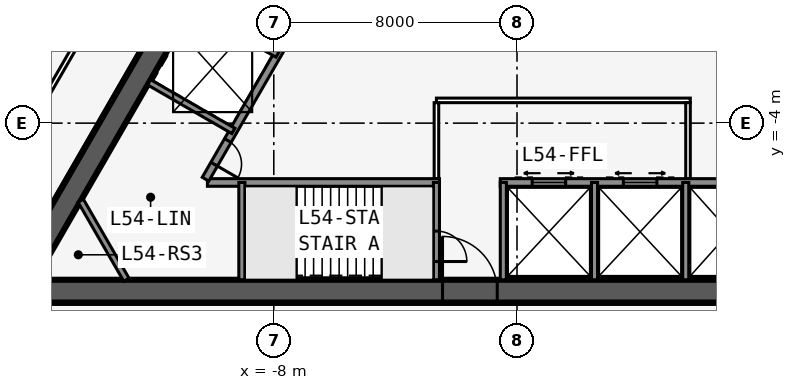
"""IFC4 building model, lengths in metres.
Left out: names, types, materials, properties, quantities, classifications, styles, units other than length and angle.
Written with IfcOpenShell. Run it as: python <this file> out.ifc"""

import sys

from ifc_helpers import new_model, si_unit, direction, frame, frame_2d, origin, place, context, subcontext, project, spatial, rectangle, extrude, element, fill, save


model = new_model("IFC4")
c1 = context("Model", 3, precision=1e-05, world=origin(), true_north=direction((0.0, 1.0)))
c2 = subcontext(c1, "Body", "Model", "MODEL_VIEW")
j1 = project(units=[si_unit("LENGTHUNIT", "METRE"), si_unit("PLANEANGLEUNIT", "RADIAN")], contexts=[c1])
p1 = place(None, origin())
s1 = spatial("IfcSite", under=j1, at=p1, CompositionType="ELEMENT")
p2 = place(p1, origin())
s2 = spatial("IfcBuilding", under=s1, at=p2, CompositionType="ELEMENT")
p3 = place(p2, frame((0.0, 0.0, 204.5)))
s3 = spatial("IfcBuildingStorey", under=s2, at=p3, CompositionType="ELEMENT", Elevation=204.5)
p4 = place(p3, frame((-16.5, -9.526, 0.0), z_axis=(0.0, 0.0, 1.0), x_axis=(1.0, 0.0, 0.0)))
e1 = element("IfcWall", 1, at=p4, inside=s3, PredefinedType="SHEAR", context=c2, shape_type="SweptSolid", body=[
    extrude(rectangle(XDim=33.0, YDim=0.75, at=frame_2d((16.5, 0.0))), origin(), (0.0, 0.0, 1.0), 3.6),
])
p5 = place(p4, frame((14.05, 0.0, 0.0)))
e2 = element("IfcOpeningElement", 2, at=p5, cuts=e1, PredefinedType="OPENING", context=c2, shape_type="SweptSolid", body=[
    extrude(rectangle(XDim=1.8, YDim=2.13, at=frame_2d((0.9, 1.065))), frame((0.0, 0.385, 0.0), z_axis=(0.0, -1.0, 0.0), x_axis=(1.0, 0.0, 0.0)), (0.0, 0.0, 1.0), 0.77),
])
p6 = place(p3, frame((-10.183, -5.951, 0.0), z_axis=(0.0, 0.0, 1.0), x_axis=(1.0, 0.0, 0.0)))
e3 = element("IfcWall", 3, at=p6, inside=s3, PredefinedType="SOLIDWALL", context=c2, shape_type="SweptSolid", body=[
    extrude(rectangle(XDim=7.633, YDim=0.25, at=frame_2d((3.816, 0.0))), origin(), (0.0, 0.0, 1.0), 3.435),
])
p7 = place(p3, frame((-0.55, -5.951, 0.0), z_axis=(0.0, 0.0, 1.0), x_axis=(1.0, 0.0, 0.0)))
e4 = element("IfcWall", 4, at=p7, inside=s3, PredefinedType="SOLIDWALL", context=c2, shape_type="SweptSolid", body=[
    extrude(rectangle(XDim=10.733, YDim=0.25, at=frame_2d((5.366, 0.0))), origin(), (0.0, 0.0, 1.0), 3.435),
])
p8 = place(p7, frame((9.314, 0.0, 0.0)))
e5 = element("IfcOpeningElement", 5, at=p8, cuts=e4, PredefinedType="OPENING", context=c2, shape_type="SweptSolid", body=[
    extrude(rectangle(XDim=0.9, YDim=2.13, at=frame_2d((0.45, 1.065))), frame((0.0, 0.135, 0.0), z_axis=(0.0, -1.0, 0.0), x_axis=(1.0, 0.0, 0.0)), (0.0, 0.0, 1.0), 0.27),
])
p9 = place(p7, frame((1.05, 0.0, 0.0)))
e6 = element("IfcOpeningElement", 6, at=p9, cuts=e4, PredefinedType="OPENING", context=c2, shape_type="SweptSolid", body=[
    extrude(rectangle(XDim=1.1, YDim=2.13, at=frame_2d((0.55, 1.065))), frame((0.0, 0.135, 0.0), z_axis=(0.0, -1.0, 0.0), x_axis=(1.0, 0.0, 0.0)), (0.0, 0.0, 1.0), 0.27),
])
p10 = place(p7, frame((4.05, 0.0, 0.0)))
e7 = element("IfcOpeningElement", 7, at=p10, cuts=e4, PredefinedType="OPENING", context=c2, shape_type="SweptSolid", body=[
    extrude(rectangle(XDim=1.1, YDim=2.13, at=frame_2d((0.55, 1.065))), frame((0.0, 0.135, 0.0), z_axis=(0.0, -1.0, 0.0), x_axis=(1.0, 0.0, 0.0)), (0.0, 0.0, 1.0), 0.27),
])
p11 = place(p3, frame((-9.05, -5.951, 0.0), z_axis=(0.0, 0.0, 1.0), x_axis=(0.0, -1.0, 0.0)))
e8 = element("IfcWall", 8, at=p11, inside=s3, PredefinedType="SOLIDWALL", context=c2, shape_type="SweptSolid", body=[
    extrude(rectangle(XDim=3.2, YDim=0.2, at=frame_2d((1.6, 0.0))), origin(), (0.0, 0.0, 1.0), 3.435),
])
p12 = place(p3, frame((-2.65, -5.951, 0.0), z_axis=(0.0, 0.0, 1.0), x_axis=(0.0, -1.0, 0.0)))
e9 = element("IfcWall", 9, at=p12, inside=s3, PredefinedType="SOLIDWALL", context=c2, shape_type="SweptSolid", body=[
    extrude(rectangle(XDim=3.2, YDim=0.2, at=frame_2d((1.6, 0.0))), origin(), (0.0, 0.0, 1.0), 3.435),
])
p13 = place(p12, frame((1.6, 0.0, 0.0)))
e10 = element("IfcOpeningElement", 10, at=p13, cuts=e9, PredefinedType="OPENING", context=c2, shape_type="SweptSolid", body=[
    extrude(rectangle(XDim=1.0, YDim=2.13, at=frame_2d((0.5, 1.065))), frame((0.0, 0.11, 0.0), z_axis=(0.0, -1.0, 0.0), x_axis=(1.0, 0.0, 0.0)), (0.0, 0.0, 1.0), 0.22),
])
for number, where, z_axis, x_axis in (
    (11, (-0.45, -5.951, 0.0), (0.0, 0.0, 1.0), (0.0, -1.0, 0.0)),
    (12, (2.55, -5.951, 0.0), (0.0, 0.0, 1.0), (0.0, -1.0, 0.0)),
    (13, (5.55, -5.951, 0.0), (0.0, 0.0, 1.0), (0.0, -1.0, 0.0)),
):
    element("IfcWall", number, at=place(p3, frame(where, z_axis=z_axis, x_axis=x_axis)), inside=s3, PredefinedType="SOLIDWALL", context=c2, shape_type="SweptSolid", body=[
        extrude(rectangle(XDim=3.2, YDim=0.2, at=frame_2d((1.6, 0.0))), origin(), (0.0, 0.0, 1.0), 3.435),
    ])
p14 = place(p3, frame((16.5, -9.526, 0.0), z_axis=(0.0, 0.0, 1.0), x_axis=(-0.499999749417, 0.866025548458, 0.0)))
e14 = element("IfcWall", 14, at=p14, inside=s3, PredefinedType="SHEAR", context=c2, shape_type="SweptSolid", body=[
    extrude(rectangle(XDim=33.0, YDim=0.75, at=frame_2d((16.5, 0.0))), origin(), (0.0, 0.0, 1.0), 3.6),
])
p15 = place(p14, frame((14.15, 0.0, 0.0)))
e15 = element("IfcOpeningElement", 15, at=p15, cuts=e14, PredefinedType="OPENING", context=c2, shape_type="SweptSolid", body=[
    extrude(rectangle(XDim=1.8, YDim=2.13, at=frame_2d((0.9, 1.065))), frame((0.0, 0.385, 0.0), z_axis=(0.0, -1.0, 0.0), x_axis=(1.0, 0.0, 0.0)), (0.0, 0.0, 1.0), 0.77),
])
p16 = place(p14, frame((12.6, 0.0, 0.0)))
e16 = element("IfcOpeningElement", 16, at=p16, cuts=e14, PredefinedType="OPENING", context=c2, shape_type="SweptSolid", body=[
    extrude(rectangle(XDim=1.0, YDim=2.13, at=frame_2d((0.5, 1.065))), frame((0.0, 0.385, 0.0), z_axis=(0.0, -1.0, 0.0), x_axis=(1.0, 0.0, 0.0)), (0.0, 0.0, 1.0), 0.77),
])
p17 = place(p3, frame((10.245, -5.843, 0.0), z_axis=(0.0, 0.0, 1.0), x_axis=(-0.499993009313, 0.866029439822, 0.0)))
e17 = element("IfcWall", 17, at=p17, inside=s3, PredefinedType="SOLIDWALL", context=c2, shape_type="SweptSolid", body=[
    extrude(rectangle(XDim=7.733, YDim=0.25, at=frame_2d((3.866, 0.0))), origin(), (0.0, 0.0, 1.0), 3.435),
])
p18 = place(p3, frame((0.0, 19.052, 0.0), z_axis=(0.0, 0.0, 1.0), x_axis=(-0.499999749417, -0.866025548458, 0.0)))
e18 = element("IfcWall", 18, at=p18, inside=s3, PredefinedType="SHEAR", context=c2, shape_type="SweptSolid", body=[
    extrude(rectangle(XDim=33.0, YDim=0.75, at=frame_2d((16.5, 0.0))), origin(), (0.0, 0.0, 1.0), 3.6),
])
p19 = place(p18, frame((14.15, 0.0, 0.0)))
e19 = element("IfcOpeningElement", 19, at=p19, cuts=e18, PredefinedType="OPENING", context=c2, shape_type="SweptSolid", body=[
    extrude(rectangle(XDim=1.8, YDim=2.13, at=frame_2d((0.9, 1.065))), frame((0.0, 0.385, 0.0), z_axis=(0.0, -1.0, 0.0), x_axis=(1.0, 0.0, 0.0)), (0.0, 0.0, 1.0), 0.77),
])
p20 = place(p18, frame((12.6, 0.0, 0.0)))
e20 = element("IfcOpeningElement", 20, at=p20, cuts=e18, PredefinedType="OPENING", context=c2, shape_type="SweptSolid", body=[
    extrude(rectangle(XDim=1.0, YDim=2.13, at=frame_2d((0.5, 1.065))), frame((0.0, 0.385, 0.0), z_axis=(0.0, -1.0, 0.0), x_axis=(1.0, 0.0, 0.0)), (0.0, 0.0, 1.0), 0.77),
])
p21 = place(p3, frame((-4.929, 3.365, 0.0), z_axis=(0.0, 0.0, 1.0), x_axis=(-0.499991433582, -0.866030349552, 0.0)))
e21 = element("IfcWall", 21, at=p21, inside=s3, PredefinedType="SOLIDWALL", context=c2, shape_type="SweptSolid", body=[
    extrude(rectangle(XDim=10.633, YDim=0.25, at=frame_2d((5.316, 0.0))), origin(), (0.0, 0.0, 1.0), 3.435),
])
p22 = place(p21, frame((9.164, 0.0, 0.0)))
e22 = element("IfcOpeningElement", 22, at=p22, cuts=e21, PredefinedType="OPENING", context=c2, shape_type="SweptSolid", body=[
    extrude(rectangle(XDim=0.9, YDim=2.13, at=frame_2d((0.45, 1.065))), frame((0.0, 0.135, 0.0), z_axis=(0.0, -1.0, 0.0), x_axis=(1.0, 0.0, 0.0)), (0.0, 0.0, 1.0), 0.27),
])
p23 = place(p21, frame((1.1, 0.0, 0.0)))
e23 = element("IfcOpeningElement", 23, at=p23, cuts=e21, PredefinedType="OPENING", context=c2, shape_type="SweptSolid", body=[
    extrude(rectangle(XDim=0.9, YDim=2.13, at=frame_2d((0.45, 1.065))), frame((0.0, 0.135, 0.0), z_axis=(0.0, -1.0, 0.0), x_axis=(1.0, 0.0, 0.0)), (0.0, 0.0, 1.0), 0.27),
])
p24 = place(p21, frame((4.0, 0.0, 0.0)))
e24 = element("IfcOpeningElement", 24, at=p24, cuts=e21, PredefinedType="OPENING", context=c2, shape_type="SweptSolid", body=[
    extrude(rectangle(XDim=0.9, YDim=2.13, at=frame_2d((0.45, 1.065))), frame((0.0, 0.135, 0.0), z_axis=(0.0, -1.0, 0.0), x_axis=(1.0, 0.0, 0.0)), (0.0, 0.0, 1.0), 0.27),
])
p25 = place(p3, frame((-7.879, -1.744, 0.0), z_axis=(0.0, 0.0, 1.0), x_axis=(-0.866042017984, 0.499971222258, 0.0)))
e25 = element("IfcWall", 25, at=p25, inside=s3, PredefinedType="SOLIDWALL", context=c2, shape_type="SweptSolid", body=[
    extrude(rectangle(XDim=3.2, YDim=0.2, at=frame_2d((1.6, 0.0))), origin(), (0.0, 0.0, 1.0), 3.435),
])
p26 = place(p3, frame((-9.329, -4.256, 0.0), z_axis=(0.0, 0.0, 1.0), x_axis=(-0.866022944154, 0.50000426018, 0.0)))
e26 = element("IfcWall", 26, at=p26, inside=s3, PredefinedType="SOLIDWALL", context=c2, shape_type="SweptSolid", body=[
    extrude(rectangle(XDim=3.2, YDim=0.2, at=frame_2d((1.6, 0.0))), origin(), (0.0, 0.0, 1.0), 3.435),
])
p27 = place(p3, frame((20.102, -11.115, 0.0), z_axis=(0.0, 0.0, 1.0), x_axis=(-0.500000265775, 0.866025250339, 0.0)))
e27 = element("IfcWall", 27, at=p27, inside=s3, PredefinedType="PARTITIONING", context=c2, shape_type="SweptSolid", body=[
    extrude(rectangle(XDim=39.354, YDim=0.15, at=frame_2d((19.677, 0.0))), origin(), (0.0, 0.0, 1.0), 3.435),
])
p28 = place(p27, frame((1.665, 0.0, 0.0)))
e28 = element("IfcOpeningElement", 28, at=p28, cuts=e27, PredefinedType="OPENING", context=c2, shape_type="SweptSolid", body=[
    extrude(rectangle(XDim=0.95, YDim=2.13, at=frame_2d((0.475, 1.065))), frame((0.0, 0.085, 0.0), z_axis=(0.0, -1.0, 0.0), x_axis=(1.0, 0.0, 0.0)), (0.0, 0.0, 1.0), 0.17),
])
p29 = place(p27, frame((12.902, 0.0, 0.0)))
e29 = element("IfcOpeningElement", 29, at=p29, cuts=e27, PredefinedType="OPENING", context=c2, shape_type="SweptSolid", body=[
    extrude(rectangle(XDim=0.95, YDim=2.13, at=frame_2d((0.475, 1.065))), frame((0.0, 0.085, 0.0), z_axis=(0.0, -1.0, 0.0), x_axis=(1.0, 0.0, 0.0)), (0.0, 0.0, 1.0), 0.17),
])
p30 = place(p27, frame((17.302, 0.0, 0.0)))
e30 = element("IfcOpeningElement", 30, at=p30, cuts=e27, PredefinedType="OPENING", context=c2, shape_type="SweptSolid", body=[
    extrude(rectangle(XDim=0.95, YDim=2.13, at=frame_2d((0.475, 1.065))), frame((0.0, 0.085, 0.0), z_axis=(0.0, -1.0, 0.0), x_axis=(1.0, 0.0, 0.0)), (0.0, 0.0, 1.0), 0.17),
])
p31 = place(p27, frame((22.902, 0.0, 0.0)))
e31 = element("IfcOpeningElement", 31, at=p31, cuts=e27, PredefinedType="OPENING", context=c2, shape_type="SweptSolid", body=[
    extrude(rectangle(XDim=0.95, YDim=2.13, at=frame_2d((0.475, 1.065))), frame((0.0, 0.085, 0.0), z_axis=(0.0, -1.0, 0.0), x_axis=(1.0, 0.0, 0.0)), (0.0, 0.0, 1.0), 0.17),
])
p32 = place(p27, frame((32.302, 0.0, 0.0)))
e32 = element("IfcOpeningElement", 32, at=p32, cuts=e27, PredefinedType="OPENING", context=c2, shape_type="SweptSolid", body=[
    extrude(rectangle(XDim=0.95, YDim=2.13, at=frame_2d((0.475, 1.065))), frame((0.0, 0.085, 0.0), z_axis=(0.0, -1.0, 0.0), x_axis=(1.0, 0.0, 0.0)), (0.0, 0.0, 1.0), 0.17),
])
p33 = place(p27, frame((37.302, 0.0, 0.0)))
e33 = element("IfcOpeningElement", 33, at=p33, cuts=e27, PredefinedType="OPENING", context=c2, shape_type="SweptSolid", body=[
    extrude(rectangle(XDim=0.95, YDim=2.13, at=frame_2d((0.475, 1.065))), frame((0.0, 0.085, 0.0), z_axis=(0.0, -1.0, 0.0), x_axis=(1.0, 0.0, 0.0)), (0.0, 0.0, 1.0), 0.17),
])
p34 = place(p3, frame((-0.425, 22.966, 0.0), z_axis=(0.0, 0.0, 1.0), x_axis=(-0.500000265775, -0.866025250339, 0.0)))
e34 = element("IfcWall", 34, at=p34, inside=s3, PredefinedType="PARTITIONING", context=c2, shape_type="SweptSolid", body=[
    extrude(rectangle(XDim=39.354, YDim=0.15, at=frame_2d((19.677, 0.0))), origin(), (0.0, 0.0, 1.0), 3.435),
])
p35 = place(p34, frame((1.102, 0.0, 0.0)))
e35 = element("IfcOpeningElement", 35, at=p35, cuts=e34, PredefinedType="OPENING", context=c2, shape_type="SweptSolid", body=[
    extrude(rectangle(XDim=0.95, YDim=2.13, at=frame_2d((0.475, 1.065))), frame((0.0, 0.085, 0.0), z_axis=(0.0, -1.0, 0.0), x_axis=(1.0, 0.0, 0.0)), (0.0, 0.0, 1.0), 0.17),
])
p36 = place(p34, frame((7.902, 0.0, 0.0)))
e36 = element("IfcOpeningElement", 36, at=p36, cuts=e34, PredefinedType="OPENING", context=c2, shape_type="SweptSolid", body=[
    extrude(rectangle(XDim=0.95, YDim=2.13, at=frame_2d((0.475, 1.065))), frame((0.0, 0.085, 0.0), z_axis=(0.0, -1.0, 0.0), x_axis=(1.0, 0.0, 0.0)), (0.0, 0.0, 1.0), 0.17),
])
p37 = place(p34, frame((17.302, 0.0, 0.0)))
e37 = element("IfcOpeningElement", 37, at=p37, cuts=e34, PredefinedType="OPENING", context=c2, shape_type="SweptSolid", body=[
    extrude(rectangle(XDim=0.95, YDim=2.13, at=frame_2d((0.475, 1.065))), frame((0.0, 0.085, 0.0), z_axis=(0.0, -1.0, 0.0), x_axis=(1.0, 0.0, 0.0)), (0.0, 0.0, 1.0), 0.17),
])
p38 = place(p34, frame((26.702, 0.0, 0.0)))
e38 = element("IfcOpeningElement", 38, at=p38, cuts=e34, PredefinedType="OPENING", context=c2, shape_type="SweptSolid", body=[
    extrude(rectangle(XDim=0.95, YDim=2.13, at=frame_2d((0.475, 1.065))), frame((0.0, 0.085, 0.0), z_axis=(0.0, -1.0, 0.0), x_axis=(1.0, 0.0, 0.0)), (0.0, 0.0, 1.0), 0.17),
])
p39 = place(p34, frame((37.302, 0.0, 0.0)))
e39 = element("IfcOpeningElement", 39, at=p39, cuts=e34, PredefinedType="OPENING", context=c2, shape_type="SweptSolid", body=[
    extrude(rectangle(XDim=0.95, YDim=2.13, at=frame_2d((0.475, 1.065))), frame((0.0, 0.085, 0.0), z_axis=(0.0, -1.0, 0.0), x_axis=(1.0, 0.0, 0.0)), (0.0, 0.0, 1.0), 0.17),
])
p40 = place(p3, frame((-2.65, -3.251, 0.0), z_axis=(0.0, 0.0, 1.0), x_axis=(1.0, 0.0, 0.0)))
e40 = element("IfcWall", 40, at=p40, inside=s3, PredefinedType="PARTITIONING", context=c2, shape_type="SweptSolid", body=[
    extrude(rectangle(XDim=8.35, YDim=0.15, at=frame_2d((4.175, 0.0))), origin(), (0.0, 0.0, 1.0), 3.435),
])
for number, where, z_axis, x_axis in (
    (41, (-2.65, -5.826, 0.0), (0.0, 0.0, 1.0), (0.0, 1.0, 0.0)),
    (42, (5.625, -5.826, 0.0), (0.0, 0.0, 1.0), (0.0, 1.0, 0.0)),
):
    element("IfcWall", number, at=place(p3, frame(where, z_axis=z_axis, x_axis=x_axis)), inside=s3, PredefinedType="PARTITIONING", context=c2, shape_type="SweptSolid", body=[
        extrude(rectangle(XDim=2.5, YDim=0.15, at=frame_2d((1.25, 0.0))), origin(), (0.0, 0.0, 1.0), 3.435),
    ])
p41 = place(p3, frame((-12.848, -9.151, 0.0), z_axis=(0.0, 0.0, 1.0), x_axis=(-0.499952404951, 0.866052881055, 0.0)))
e43 = element("IfcWall", 43, at=p41, inside=s3, PredefinedType="SOLIDWALL", context=c2, shape_type="SweptSolid", body=[
    extrude(rectangle(XDim=3.002, YDim=0.2, at=frame_2d((1.501, 0.0))), origin(), (0.0, 0.0, 1.0), 3.435),
])
p42 = place(p3, frame((-7.247, -7.576, 0.0), z_axis=(0.0, 0.0, 1.0), x_axis=(1.0, 0.0, 0.0)))
e44 = element("IfcWall", 44, at=p42, inside=s3, PredefinedType="SOLIDWALL", context=c2, shape_type="SweptSolid", body=[
    extrude(rectangle(XDim=2.794, YDim=0.1, at=frame_2d((1.397, 0.0))), origin(), (0.0, 0.0, 1.0), 3.6),
])
p43 = place(p5, origin())
e45 = element("IfcDoor", 45, at=p43, inside=s3, OperationType="DOUBLE_DOOR_SINGLE_SWING", PredefinedType="DOOR", context=c2, shape_type="SweptSolid", body=[
    extrude(rectangle(XDim=1.8, YDim=2.13, at=frame_2d((0.9, 1.065))), frame((0.0, 0.025, 0.0), z_axis=(0.0, -1.0, 0.0), x_axis=(1.0, 0.0, 0.0)), (0.0, 0.0, 1.0), 0.05),
])
fill(e2, e45)
p44 = place(p13, origin())
e46 = element("IfcDoor", 46, at=p44, inside=s3, OperationType="SINGLE_SWING_RIGHT", PredefinedType="DOOR", context=c2, shape_type="SweptSolid", body=[
    extrude(rectangle(XDim=1.0, YDim=2.13, at=frame_2d((0.5, 1.065))), frame((0.0, 0.025, 0.0), z_axis=(0.0, -1.0, 0.0), x_axis=(1.0, 0.0, 0.0)), (0.0, 0.0, 1.0), 0.05),
])
fill(e10, e46)
p45 = place(p22, origin())
e47 = element("IfcDoor", 47, at=p45, inside=s3, OperationType="SINGLE_SWING_RIGHT", PredefinedType="DOOR", context=c2, shape_type="SweptSolid", body=[
    extrude(rectangle(XDim=0.9, YDim=2.13, at=frame_2d((0.45, 1.065))), frame((0.0, 0.025, 0.0), z_axis=(0.0, -1.0, 0.0), x_axis=(1.0, 0.0, 0.0)), (0.0, 0.0, 1.0), 0.05),
])
fill(e22, e47)
p46 = place(p9, origin())
e48 = element("IfcDoor", 48, at=p46, inside=s3, OperationType="DOUBLE_DOOR_SLIDING", PredefinedType="USERDEFINED", context=c2, shape_type="SweptSolid", body=[
    extrude(rectangle(XDim=1.1, YDim=2.13, at=frame_2d((0.55, 1.065))), frame((0.0, 0.025, 0.0), z_axis=(0.0, -1.0, 0.0), x_axis=(1.0, 0.0, 0.0)), (0.0, 0.0, 1.0), 0.05),
])
fill(e6, e48)
p47 = place(p10, origin())
e49 = element("IfcDoor", 49, at=p47, inside=s3, OperationType="DOUBLE_DOOR_SLIDING", PredefinedType="USERDEFINED", context=c2, shape_type="SweptSolid", body=[
    extrude(rectangle(XDim=1.1, YDim=2.13, at=frame_2d((0.55, 1.065))), frame((0.0, 0.025, 0.0), z_axis=(0.0, -1.0, 0.0), x_axis=(1.0, 0.0, 0.0)), (0.0, 0.0, 1.0), 0.05),
])
fill(e7, e49)
save(model, sys.argv[1])
